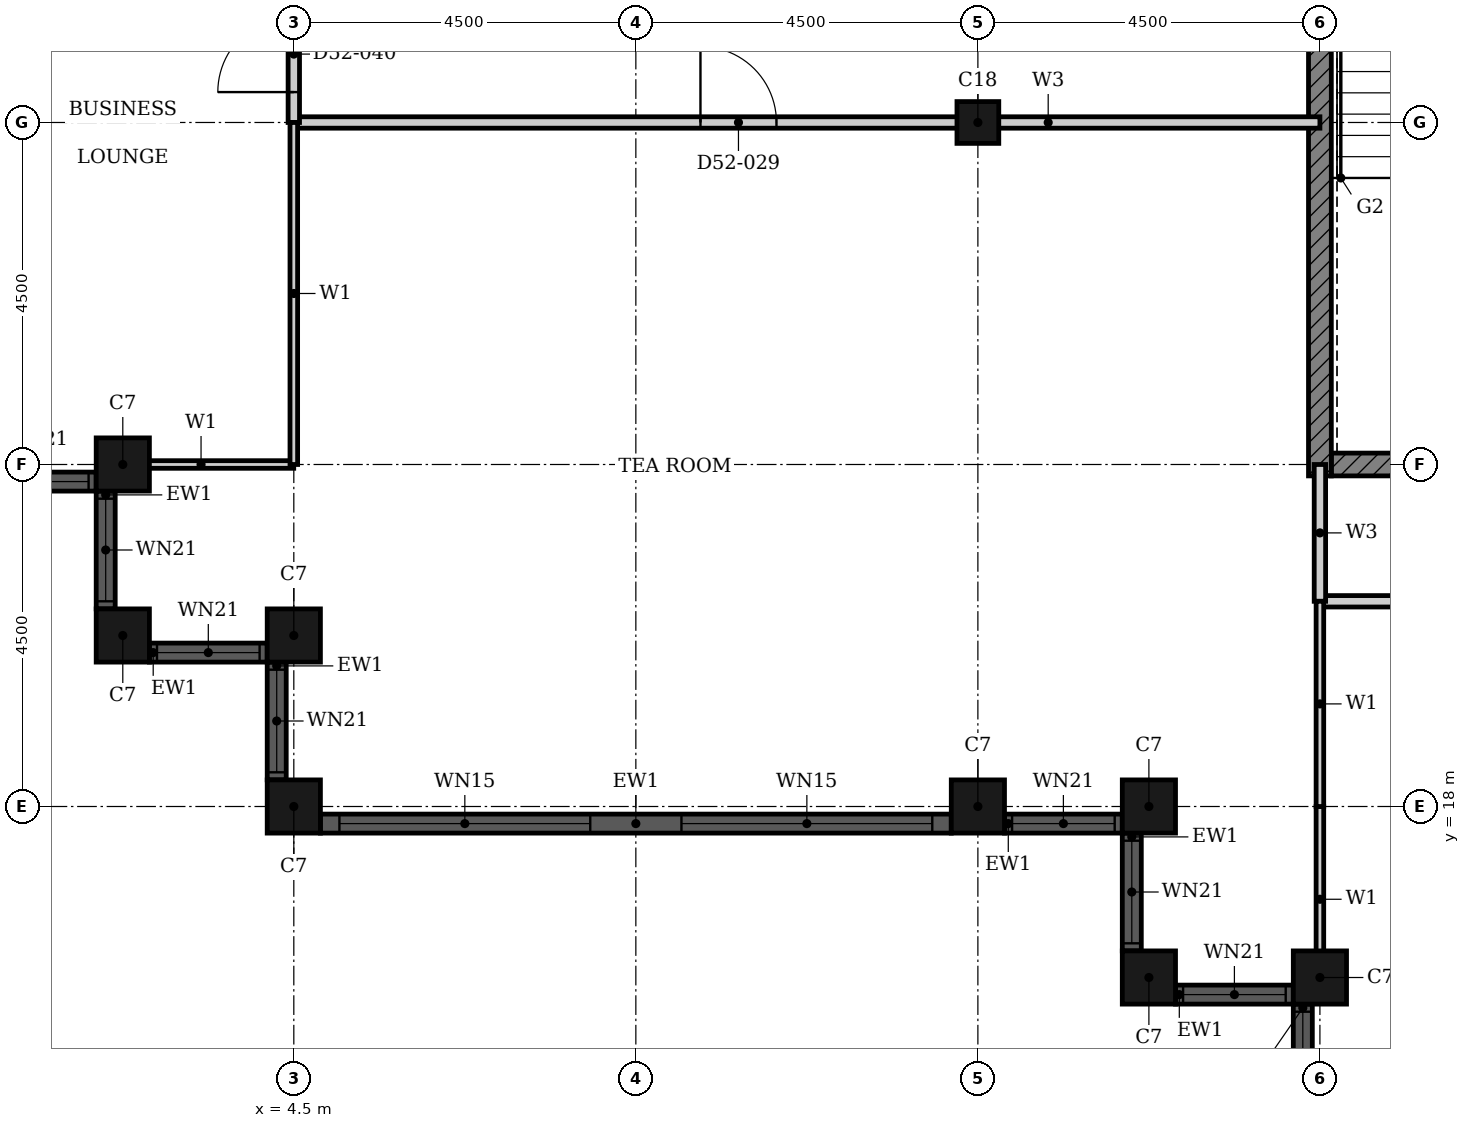
"""IFC4 building model, lengths in metres.
Left out: names, types, materials, properties, quantities, classifications, styles, units other than length and angle.
Written with IfcOpenShell. Run it as: python <this file> out.ifc"""

import sys

from ifc_helpers import new_model, si_unit, direction, frame, frame_2d, origin, origin_2d, place, context, subcontext, project, spatial, rectangle, hollow_rectangle, extrude, element, fill, save


model = new_model("IFC4")
c1 = context("Model", 3, precision=1e-05, world=origin(), true_north=direction((0.0, 1.0)))
c2 = subcontext(c1, "Body", "Model", "MODEL_VIEW")
j1 = project(units=[si_unit("LENGTHUNIT", "METRE"), si_unit("PLANEANGLEUNIT", "RADIAN")], contexts=[c1])
p1 = place(None, origin())
s1 = spatial("IfcSite", under=j1, at=p1, CompositionType="ELEMENT")
p2 = place(p1, origin())
s2 = spatial("IfcBuilding", under=s1, at=p2, CompositionType="ELEMENT")
p3 = place(p2, frame((0.0, 0.0, 207.2)))
s3 = spatial("IfcBuildingStorey", under=s2, at=p3, CompositionType="ELEMENT", Elevation=207.2)
for number, where, z_axis, x_axis in (
    (1, (2.25, 22.5, 0.0), (0.0, 0.0, 1.0), (1.0, 0.0, 0.0)),
    (2, (2.25, 20.25, 0.0), (0.0, 0.0, 1.0), (1.0, 0.0, 0.0)),
    (3, (4.5, 20.25, 0.0), (0.0, 0.0, 1.0), (1.0, 0.0, 0.0)),
    (4, (4.5, 18.0, 0.0), (0.0, 0.0, 1.0), (1.0, 0.0, 0.0)),
    (5, (13.5, 18.0, 0.0), (0.0, 0.0, 1.0), (1.0, 0.0, 0.0)),
    (6, (15.75, 18.0, 0.0), (0.0, 0.0, 1.0), (1.0, 0.0, 0.0)),
    (7, (15.75, 15.75, 0.0), (0.0, 0.0, 1.0), (1.0, 0.0, 0.0)),
    (8, (18.0, 15.75, 0.0), (0.0, 0.0, 1.0), (1.0, 0.0, 0.0)),
):
    element("IfcColumn", number, at=place(p3, frame(where, z_axis=z_axis, x_axis=x_axis)), inside=s3, PredefinedType="COLUMN", context=c2, shape_type="SweptSolid", body=[
        extrude(hollow_rectangle(XDim=0.7, YDim=0.7, WallThickness=0.022, at=origin_2d()), origin(), (0.0, 0.0, 1.0), 3.7),
    ])
p4 = place(p3, frame((13.5, 27.0, 0.0), z_axis=(0.0, 0.0, 1.0), x_axis=(1.0, 0.0, 0.0)))
e9 = element("IfcColumn", 9, at=p4, inside=s3, PredefinedType="COLUMN", context=c2, shape_type="SweptSolid", body=[
    extrude(hollow_rectangle(XDim=0.55, YDim=0.55, WallThickness=0.018, at=origin_2d()), origin(), (0.0, 0.0, 1.0), 3.7),
])
p5 = place(p3, frame((0.35, 22.275, 0.0), z_axis=(0.0, 0.0, 1.0), x_axis=(1.0, 0.0, 0.0)))
e10 = element("IfcWall", 10, at=p5, inside=s3, PredefinedType="SOLIDWALL", context=c2, shape_type="SweptSolid", body=[
    extrude(rectangle(XDim=1.55, YDim=0.25, at=frame_2d((0.775, 0.0))), origin(), (0.0, 0.0, 1.0), 3.7),
])
p6 = place(p5, frame((0.1, 0.0, 0.9)))
e11 = element("IfcOpeningElement", 11, at=p6, cuts=e10, PredefinedType="OPENING", context=c2, shape_type="SweptSolid", body=[
    extrude(rectangle(XDim=1.35, YDim=1.85, at=frame_2d((0.675, 0.925))), frame((0.0, 0.135, 0.0), z_axis=(0.0, -1.0, 0.0), x_axis=(1.0, 0.0, 0.0)), (0.0, 0.0, 1.0), 0.27),
])
p7 = place(p3, frame((2.025, 22.15, 0.0), z_axis=(0.0, 0.0, 1.0), x_axis=(0.0, -1.0, 0.0)))
e12 = element("IfcWall", 12, at=p7, inside=s3, PredefinedType="SOLIDWALL", context=c2, shape_type="SweptSolid", body=[
    extrude(rectangle(XDim=1.55, YDim=0.25, at=frame_2d((0.775, 0.0))), origin(), (0.0, 0.0, 1.0), 3.7),
])
p8 = place(p7, frame((0.1, 0.0, 0.9)))
e13 = element("IfcOpeningElement", 13, at=p8, cuts=e12, PredefinedType="OPENING", context=c2, shape_type="SweptSolid", body=[
    extrude(rectangle(XDim=1.35, YDim=1.85, at=frame_2d((0.675, 0.925))), frame((0.0, 0.135, 0.0), z_axis=(0.0, -1.0, 0.0), x_axis=(1.0, 0.0, 0.0)), (0.0, 0.0, 1.0), 0.27),
])
p9 = place(p3, frame((2.6, 20.025, 0.0), z_axis=(0.0, 0.0, 1.0), x_axis=(1.0, 0.0, 0.0)))
e14 = element("IfcWall", 14, at=p9, inside=s3, PredefinedType="SOLIDWALL", context=c2, shape_type="SweptSolid", body=[
    extrude(rectangle(XDim=1.55, YDim=0.25, at=frame_2d((0.775, 0.0))), origin(), (0.0, 0.0, 1.0), 3.7),
])
p10 = place(p9, frame((0.1, 0.0, 0.9)))
e15 = element("IfcOpeningElement", 15, at=p10, cuts=e14, PredefinedType="OPENING", context=c2, shape_type="SweptSolid", body=[
    extrude(rectangle(XDim=1.35, YDim=1.85, at=frame_2d((0.675, 0.925))), frame((0.0, 0.135, 0.0), z_axis=(0.0, -1.0, 0.0), x_axis=(1.0, 0.0, 0.0)), (0.0, 0.0, 1.0), 0.27),
])
p11 = place(p3, frame((4.275, 19.9, 0.0), z_axis=(0.0, 0.0, 1.0), x_axis=(0.0, -1.0, 0.0)))
e16 = element("IfcWall", 16, at=p11, inside=s3, PredefinedType="SOLIDWALL", context=c2, shape_type="SweptSolid", body=[
    extrude(rectangle(XDim=1.55, YDim=0.25, at=frame_2d((0.775, 0.0))), origin(), (0.0, 0.0, 1.0), 3.7),
])
p12 = place(p11, frame((0.1, 0.0, 0.9)))
e17 = element("IfcOpeningElement", 17, at=p12, cuts=e16, PredefinedType="OPENING", context=c2, shape_type="SweptSolid", body=[
    extrude(rectangle(XDim=1.35, YDim=1.85, at=frame_2d((0.675, 0.925))), frame((0.0, 0.135, 0.0), z_axis=(0.0, -1.0, 0.0), x_axis=(1.0, 0.0, 0.0)), (0.0, 0.0, 1.0), 0.27),
])
p13 = place(p3, frame((4.85, 17.775, 0.0), z_axis=(0.0, 0.0, 1.0), x_axis=(1.0, 0.0, 0.0)))
e18 = element("IfcWall", 18, at=p13, inside=s3, PredefinedType="SOLIDWALL", context=c2, shape_type="SweptSolid", body=[
    extrude(rectangle(XDim=8.3, YDim=0.25, at=frame_2d((4.15, 0.0))), origin(), (0.0, 0.0, 1.0), 3.7),
])
p14 = place(p13, frame((0.25, 0.0, 0.45)))
e19 = element("IfcOpeningElement", 19, at=p14, cuts=e18, PredefinedType="OPENING", context=c2, shape_type="SweptSolid", body=[
    extrude(rectangle(XDim=3.3, YDim=2.3, at=frame_2d((1.65, 1.15))), frame((0.0, 0.135, 0.0), z_axis=(0.0, -1.0, 0.0), x_axis=(1.0, 0.0, 0.0)), (0.0, 0.0, 1.0), 0.27),
])
p15 = place(p13, frame((4.75, 0.0, 0.45)))
e20 = element("IfcOpeningElement", 20, at=p15, cuts=e18, PredefinedType="OPENING", context=c2, shape_type="SweptSolid", body=[
    extrude(rectangle(XDim=3.3, YDim=2.3, at=frame_2d((1.65, 1.15))), frame((0.0, 0.135, 0.0), z_axis=(0.0, -1.0, 0.0), x_axis=(1.0, 0.0, 0.0)), (0.0, 0.0, 1.0), 0.27),
])
p16 = place(p3, frame((13.85, 17.775, 0.0), z_axis=(0.0, 0.0, 1.0), x_axis=(1.0, 0.0, 0.0)))
e21 = element("IfcWall", 21, at=p16, inside=s3, PredefinedType="SOLIDWALL", context=c2, shape_type="SweptSolid", body=[
    extrude(rectangle(XDim=1.55, YDim=0.25, at=frame_2d((0.775, 0.0))), origin(), (0.0, 0.0, 1.0), 3.7),
])
p17 = place(p16, frame((0.1, 0.0, 0.9)))
e22 = element("IfcOpeningElement", 22, at=p17, cuts=e21, PredefinedType="OPENING", context=c2, shape_type="SweptSolid", body=[
    extrude(rectangle(XDim=1.35, YDim=1.85, at=frame_2d((0.675, 0.925))), frame((0.0, 0.135, 0.0), z_axis=(0.0, -1.0, 0.0), x_axis=(1.0, 0.0, 0.0)), (0.0, 0.0, 1.0), 0.27),
])
p18 = place(p3, frame((15.525, 17.65, 0.0), z_axis=(0.0, 0.0, 1.0), x_axis=(0.0, -1.0, 0.0)))
e23 = element("IfcWall", 23, at=p18, inside=s3, PredefinedType="SOLIDWALL", context=c2, shape_type="SweptSolid", body=[
    extrude(rectangle(XDim=1.55, YDim=0.25, at=frame_2d((0.775, 0.0))), origin(), (0.0, 0.0, 1.0), 3.7),
])
p19 = place(p18, frame((0.1, 0.0, 0.9)))
e24 = element("IfcOpeningElement", 24, at=p19, cuts=e23, PredefinedType="OPENING", context=c2, shape_type="SweptSolid", body=[
    extrude(rectangle(XDim=1.35, YDim=1.85, at=frame_2d((0.675, 0.925))), frame((0.0, 0.135, 0.0), z_axis=(0.0, -1.0, 0.0), x_axis=(1.0, 0.0, 0.0)), (0.0, 0.0, 1.0), 0.27),
])
p20 = place(p3, frame((16.1, 15.525, 0.0), z_axis=(0.0, 0.0, 1.0), x_axis=(1.0, 0.0, 0.0)))
e25 = element("IfcWall", 25, at=p20, inside=s3, PredefinedType="SOLIDWALL", context=c2, shape_type="SweptSolid", body=[
    extrude(rectangle(XDim=1.55, YDim=0.25, at=frame_2d((0.775, 0.0))), origin(), (0.0, 0.0, 1.0), 3.7),
])
p21 = place(p20, frame((0.1, 0.0, 0.9)))
e26 = element("IfcOpeningElement", 26, at=p21, cuts=e25, PredefinedType="OPENING", context=c2, shape_type="SweptSolid", body=[
    extrude(rectangle(XDim=1.35, YDim=1.85, at=frame_2d((0.675, 0.925))), frame((0.0, 0.135, 0.0), z_axis=(0.0, -1.0, 0.0), x_axis=(1.0, 0.0, 0.0)), (0.0, 0.0, 1.0), 0.27),
])
p22 = place(p3, frame((17.775, 15.4, 0.0), z_axis=(0.0, 0.0, 1.0), x_axis=(0.0, -1.0, 0.0)))
e27 = element("IfcWall", 27, at=p22, inside=s3, PredefinedType="SOLIDWALL", context=c2, shape_type="SweptSolid", body=[
    extrude(rectangle(XDim=1.55, YDim=0.25, at=frame_2d((0.775, 0.0))), origin(), (0.0, 0.0, 1.0), 3.7),
])
p23 = place(p22, frame((0.1, 0.0, 0.9)))
e28 = element("IfcOpeningElement", 28, at=p23, cuts=e27, PredefinedType="OPENING", context=c2, shape_type="SweptSolid", body=[
    extrude(rectangle(XDim=1.35, YDim=1.85, at=frame_2d((0.675, 0.925))), frame((0.0, 0.135, 0.0), z_axis=(0.0, -1.0, 0.0), x_axis=(1.0, 0.0, 0.0)), (0.0, 0.0, 1.0), 0.27),
])
p24 = place(p3, frame((18.15, 22.5, 0.0), z_axis=(0.0, 0.0, 1.0), x_axis=(1.0, 0.0, 0.0)))
e29 = element("IfcWall", 29, at=p24, inside=s3, PredefinedType="SHEAR", context=c2, shape_type="SweptSolid", body=[
    extrude(rectangle(XDim=4.225, YDim=0.3, at=frame_2d((2.113, 0.0))), origin(), (0.0, 0.0, 1.0), 3.4),
])
p25 = place(p3, frame((18.0, 22.35, 0.0), z_axis=(0.0, 0.0, 1.0), x_axis=(0.0, 1.0, 0.0)))
e30 = element("IfcWall", 30, at=p25, inside=s3, PredefinedType="SHEAR", context=c2, shape_type="SweptSolid", body=[
    extrude(rectangle(XDim=9.3, YDim=0.3, at=frame_2d((4.65, 0.0))), origin(), (0.0, 0.0, 1.0), 3.4),
])
p26 = place(p3, frame((18.0, 20.7, 0.0), z_axis=(0.0, 0.0, 1.0), x_axis=(1.0, 0.0, 0.0)))
e31 = element("IfcWall", 31, at=p26, inside=s3, PredefinedType="PARTITIONING", context=c2, shape_type="SweptSolid", body=[
    extrude(rectangle(XDim=13.5, YDim=0.15, at=frame_2d((6.75, 0.0))), origin(), (0.0, 0.0, 1.0), 3.4),
])
p27 = place(p26, frame((6.25, 0.0, 0.0)))
e32 = element("IfcOpeningElement", 32, at=p27, cuts=e31, PredefinedType="OPENING", context=c2, shape_type="SweptSolid", body=[
    extrude(rectangle(XDim=1.0, YDim=2.1, at=frame_2d((0.5, 1.05))), frame((0.0, 0.085, 0.0), z_axis=(0.0, -1.0, 0.0), x_axis=(1.0, 0.0, 0.0)), (0.0, 0.0, 1.0), 0.17),
])
p28 = place(p3, frame((4.5, 27.0, 0.0), z_axis=(0.0, 0.0, 1.0), x_axis=(1.0, 0.0, 0.0)))
e33 = element("IfcWall", 33, at=p28, inside=s3, PredefinedType="PARTITIONING", context=c2, shape_type="SweptSolid", body=[
    extrude(rectangle(XDim=13.5, YDim=0.15, at=frame_2d((6.75, 0.0))), origin(), (0.0, 0.0, 1.0), 2.68),
])
p29 = place(p28, frame((5.35, 0.0, 0.0)))
e34 = element("IfcOpeningElement", 34, at=p29, cuts=e33, PredefinedType="OPENING", context=c2, shape_type="SweptSolid", body=[
    extrude(rectangle(XDim=1.0, YDim=2.1, at=frame_2d((0.5, 1.05))), frame((0.0, 0.085, 0.0), z_axis=(0.0, -1.0, 0.0), x_axis=(1.0, 0.0, 0.0)), (0.0, 0.0, 1.0), 0.17),
])
p30 = place(p3, frame((18.0, 20.7, 0.0), z_axis=(0.0, 0.0, 1.0), x_axis=(0.0, 1.0, 0.0)))
e35 = element("IfcWall", 35, at=p30, inside=s3, PredefinedType="PARTITIONING", context=c2, shape_type="SweptSolid", body=[
    extrude(rectangle(XDim=1.8, YDim=0.15, at=frame_2d((0.9, 0.0))), origin(), (0.0, 0.0, 1.0), 3.4),
])
p31 = place(p3, frame((4.5, 27.0, 0.0), z_axis=(0.0, 0.0, 1.0), x_axis=(0.0, 1.0, 0.0)))
e36 = element("IfcWall", 36, at=p31, inside=s3, PredefinedType="PARTITIONING", context=c2, shape_type="SweptSolid", body=[
    extrude(rectangle(XDim=1.8, YDim=0.15, at=frame_2d((0.9, 0.0))), origin(), (0.0, 0.0, 1.0), 3.4),
])
p32 = place(p31, frame((0.4, 0.0, 0.0)))
e37 = element("IfcOpeningElement", 37, at=p32, cuts=e36, PredefinedType="OPENING", context=c2, shape_type="SweptSolid", body=[
    extrude(rectangle(XDim=1.0, YDim=2.1, at=frame_2d((0.5, 1.05))), frame((0.0, 0.085, 0.0), z_axis=(0.0, -1.0, 0.0), x_axis=(1.0, 0.0, 0.0)), (0.0, 0.0, 1.0), 0.17),
])
p33 = place(p3, frame((2.06, 22.5, 0.0), z_axis=(0.0, 0.0, 1.0), x_axis=(1.0, 0.0, 0.0)))
e38 = element("IfcWall", 38, at=p33, inside=s3, PredefinedType="PARTITIONING", context=c2, shape_type="SweptSolid", body=[
    extrude(rectangle(XDim=2.439, YDim=0.1, at=frame_2d((1.219, 0.0))), origin(), (0.0, 0.0, 1.0), 2.68),
])
p34 = place(p3, frame((18.0, 15.56, 0.0), z_axis=(0.0, 0.0, 1.0), x_axis=(0.0, 1.0, 0.0)))
e39 = element("IfcWall", 39, at=p34, inside=s3, PredefinedType="PARTITIONING", context=c2, shape_type="SweptSolid", body=[
    extrude(rectangle(XDim=2.439, YDim=0.1, at=frame_2d((1.219, 0.0))), origin(), (0.0, 0.0, 1.0), 3.4),
])
p35 = place(p3, frame((18.0, 18.0, 0.0), z_axis=(0.0, 0.0, 1.0), x_axis=(0.0, 1.0, 0.0)))
e40 = element("IfcWall", 40, at=p35, inside=s3, PredefinedType="PARTITIONING", context=c2, shape_type="SweptSolid", body=[
    extrude(rectangle(XDim=2.7, YDim=0.1, at=frame_2d((1.35, 0.0))), origin(), (0.0, 0.0, 1.0), 3.4),
])
p36 = place(p3, frame((4.5, 22.5, 0.0), z_axis=(0.0, 0.0, 1.0), x_axis=(0.0, 1.0, 0.0)))
e41 = element("IfcWall", 41, at=p36, inside=s3, PredefinedType="PARTITIONING", context=c2, shape_type="SweptSolid", body=[
    extrude(rectangle(XDim=4.5, YDim=0.1, at=frame_2d((2.25, 0.0))), origin(), (0.0, 0.0, 1.0), 3.4),
])
p37 = place(p6, origin())
e42 = element("IfcWindow", 42, at=p37, inside=s3, PartitioningType="SINGLE_PANEL", PredefinedType="WINDOW", context=c2, shape_type="SweptSolid", body=[
    extrude(rectangle(XDim=1.35, YDim=1.85, at=frame_2d((0.675, 0.925))), frame((0.0, 0.03, 0.0), z_axis=(0.0, -1.0, 0.0), x_axis=(1.0, 0.0, 0.0)), (0.0, 0.0, 1.0), 0.06),
])
fill(e11, e42)
p38 = place(p8, origin())
e43 = element("IfcWindow", 43, at=p38, inside=s3, PartitioningType="SINGLE_PANEL", PredefinedType="WINDOW", context=c2, shape_type="SweptSolid", body=[
    extrude(rectangle(XDim=1.35, YDim=1.85, at=frame_2d((0.675, 0.925))), frame((0.0, 0.03, 0.0), z_axis=(0.0, -1.0, 0.0), x_axis=(1.0, 0.0, 0.0)), (0.0, 0.0, 1.0), 0.06),
])
fill(e13, e43)
p39 = place(p10, origin())
e44 = element("IfcWindow", 44, at=p39, inside=s3, PartitioningType="SINGLE_PANEL", PredefinedType="WINDOW", context=c2, shape_type="SweptSolid", body=[
    extrude(rectangle(XDim=1.35, YDim=1.85, at=frame_2d((0.675, 0.925))), frame((0.0, 0.03, 0.0), z_axis=(0.0, -1.0, 0.0), x_axis=(1.0, 0.0, 0.0)), (0.0, 0.0, 1.0), 0.06),
])
fill(e15, e44)
p40 = place(p12, origin())
e45 = element("IfcWindow", 45, at=p40, inside=s3, PartitioningType="SINGLE_PANEL", PredefinedType="WINDOW", context=c2, shape_type="SweptSolid", body=[
    extrude(rectangle(XDim=1.35, YDim=1.85, at=frame_2d((0.675, 0.925))), frame((0.0, 0.03, 0.0), z_axis=(0.0, -1.0, 0.0), x_axis=(1.0, 0.0, 0.0)), (0.0, 0.0, 1.0), 0.06),
])
fill(e17, e45)
p41 = place(p14, origin())
e46 = element("IfcWindow", 46, at=p41, inside=s3, PartitioningType="SINGLE_PANEL", PredefinedType="WINDOW", context=c2, shape_type="SweptSolid", body=[
    extrude(rectangle(XDim=3.3, YDim=2.3, at=frame_2d((1.65, 1.15))), frame((0.0, 0.03, 0.0), z_axis=(0.0, -1.0, 0.0), x_axis=(1.0, 0.0, 0.0)), (0.0, 0.0, 1.0), 0.06),
])
fill(e19, e46)
p42 = place(p15, origin())
e47 = element("IfcWindow", 47, at=p42, inside=s3, PartitioningType="SINGLE_PANEL", PredefinedType="WINDOW", context=c2, shape_type="SweptSolid", body=[
    extrude(rectangle(XDim=3.3, YDim=2.3, at=frame_2d((1.65, 1.15))), frame((0.0, 0.03, 0.0), z_axis=(0.0, -1.0, 0.0), x_axis=(1.0, 0.0, 0.0)), (0.0, 0.0, 1.0), 0.06),
])
fill(e20, e47)
p43 = place(p17, origin())
e48 = element("IfcWindow", 48, at=p43, inside=s3, PartitioningType="SINGLE_PANEL", PredefinedType="WINDOW", context=c2, shape_type="SweptSolid", body=[
    extrude(rectangle(XDim=1.35, YDim=1.85, at=frame_2d((0.675, 0.925))), frame((0.0, 0.03, 0.0), z_axis=(0.0, -1.0, 0.0), x_axis=(1.0, 0.0, 0.0)), (0.0, 0.0, 1.0), 0.06),
])
fill(e22, e48)
p44 = place(p19, origin())
e49 = element("IfcWindow", 49, at=p44, inside=s3, PartitioningType="SINGLE_PANEL", PredefinedType="WINDOW", context=c2, shape_type="SweptSolid", body=[
    extrude(rectangle(XDim=1.35, YDim=1.85, at=frame_2d((0.675, 0.925))), frame((0.0, 0.03, 0.0), z_axis=(0.0, -1.0, 0.0), x_axis=(1.0, 0.0, 0.0)), (0.0, 0.0, 1.0), 0.06),
])
fill(e24, e49)
p45 = place(p21, origin())
e50 = element("IfcWindow", 50, at=p45, inside=s3, PartitioningType="SINGLE_PANEL", PredefinedType="WINDOW", context=c2, shape_type="SweptSolid", body=[
    extrude(rectangle(XDim=1.35, YDim=1.85, at=frame_2d((0.675, 0.925))), frame((0.0, 0.03, 0.0), z_axis=(0.0, -1.0, 0.0), x_axis=(1.0, 0.0, 0.0)), (0.0, 0.0, 1.0), 0.06),
])
fill(e26, e50)
p46 = place(p23, origin())
e51 = element("IfcWindow", 51, at=p46, inside=s3, PartitioningType="SINGLE_PANEL", PredefinedType="WINDOW", context=c2, shape_type="SweptSolid", body=[
    extrude(rectangle(XDim=1.35, YDim=1.85, at=frame_2d((0.675, 0.925))), frame((0.0, 0.03, 0.0), z_axis=(0.0, -1.0, 0.0), x_axis=(1.0, 0.0, 0.0)), (0.0, 0.0, 1.0), 0.06),
])
fill(e28, e51)
p47 = place(p29, origin())
e52 = element("IfcDoor", 52, at=p47, inside=s3, OperationType="SINGLE_SWING_LEFT", PredefinedType="DOOR", context=c2, shape_type="SweptSolid", body=[
    extrude(rectangle(XDim=1.0, YDim=2.1, at=frame_2d((0.5, 1.05))), frame((0.0, 0.025, 0.0), z_axis=(0.0, -1.0, 0.0), x_axis=(1.0, 0.0, 0.0)), (0.0, 0.0, 1.0), 0.05),
])
fill(e34, e52)
p48 = place(p32, origin())
e53 = element("IfcDoor", 53, at=p48, inside=s3, OperationType="SINGLE_SWING_RIGHT", PredefinedType="DOOR", context=c2, shape_type="SweptSolid", body=[
    extrude(rectangle(XDim=1.0, YDim=2.1, at=frame_2d((0.5, 1.05))), frame((0.0, 0.025, 0.0), z_axis=(0.0, -1.0, 0.0), x_axis=(1.0, 0.0, 0.0)), (0.0, 0.0, 1.0), 0.05),
])
fill(e37, e53)
save(model, sys.argv[1])
